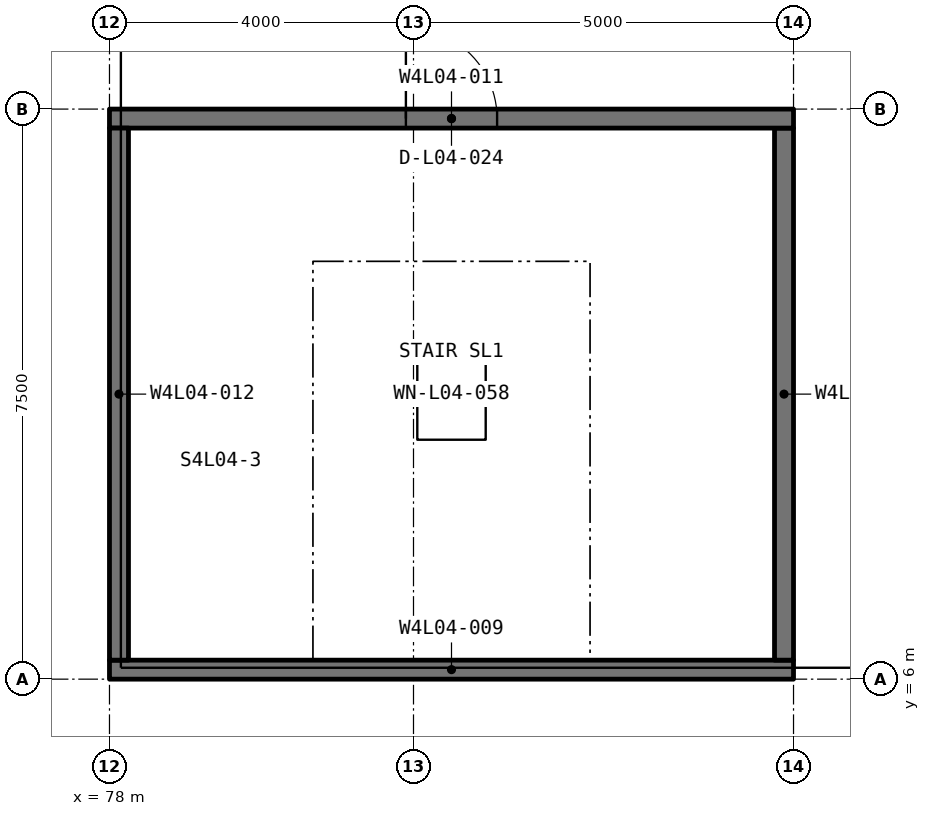
"""IFC4 building model, lengths in metres.
Left out: names, types, materials, properties, quantities, classifications, styles, units other than length and angle.
Written with IfcOpenShell. Run it as: python <this file> out.ifc"""

import sys

from ifc_helpers import new_model, si_unit, direction, frame, frame_2d, origin, origin_2d, place, context, subcontext, project, spatial, rectangle, extrude, element, fill, save


model = new_model("IFC4")
c1 = context("Model", 3, precision=1e-05, world=origin(), true_north=direction((0.0, 1.0)))
c2 = subcontext(c1, "Body", "Model", "MODEL_VIEW")
j1 = project(units=[si_unit("LENGTHUNIT", "METRE"), si_unit("PLANEANGLEUNIT", "RADIAN")], contexts=[c1])
p1 = place(None, origin())
s1 = spatial("IfcSite", under=j1, at=p1, CompositionType="ELEMENT")
p2 = place(p1, origin())
s2 = spatial("IfcBuilding", under=s1, at=p2, CompositionType="ELEMENT")
p3 = place(p2, frame((0.0, 0.0, 20.25)))
s3 = spatial("IfcBuildingStorey", under=s2, at=p3, CompositionType="ELEMENT", Elevation=20.25)
p4 = place(p3, frame((78.0, 6.125, -0.3), z_axis=(0.0, 0.0, 1.0), x_axis=(1.0, 0.0, 0.0)))
e1 = element("IfcWall", 1, at=p4, inside=s3, PredefinedType="SHEAR", context=c2, shape_type="SweptSolid", body=[
    extrude(rectangle(XDim=9.0, YDim=0.25, at=frame_2d((4.5, 0.0))), origin(), (0.0, 0.0, 1.0), 3.05),
])
p5 = place(p3, frame((86.875, 6.25, -0.3), z_axis=(0.0, 0.0, 1.0), x_axis=(0.0, 1.0, 0.0)))
e2 = element("IfcWall", 2, at=p5, inside=s3, PredefinedType="SHEAR", context=c2, shape_type="SweptSolid", body=[
    extrude(rectangle(XDim=7.0, YDim=0.25, at=frame_2d((3.5, 0.0))), origin(), (0.0, 0.0, 1.0), 3.05),
])
p6 = place(p3, frame((78.0, 13.375, -0.3), z_axis=(0.0, 0.0, 1.0), x_axis=(1.0, 0.0, 0.0)))
e3 = element("IfcWall", 3, at=p6, inside=s3, PredefinedType="SHEAR", context=c2, shape_type="SweptSolid", body=[
    extrude(rectangle(XDim=9.0, YDim=0.25, at=frame_2d((4.5, 0.0))), origin(), (0.0, 0.0, 1.0), 3.05),
])
p7 = place(p6, frame((3.9, 0.0, 0.3)))
e4 = element("IfcOpeningElement", 4, at=p7, cuts=e3, PredefinedType="OPENING", context=c2, shape_type="SweptSolid", body=[
    extrude(rectangle(XDim=1.2, YDim=2.2, at=frame_2d((0.6, 1.1))), frame((0.0, 0.135, 0.0), z_axis=(0.0, -1.0, 0.0), x_axis=(1.0, 0.0, 0.0)), (0.0, 0.0, 1.0), 0.27),
])
p8 = place(p3, frame((78.125, 6.25, -0.3), z_axis=(0.0, 0.0, 1.0), x_axis=(0.0, 1.0, 0.0)))
e5 = element("IfcWall", 5, at=p8, inside=s3, PredefinedType="SHEAR", context=c2, shape_type="SweptSolid", body=[
    extrude(rectangle(XDim=7.0, YDim=0.25, at=frame_2d((3.5, 0.0))), origin(), (0.0, 0.0, 1.0), 3.05),
])
p9 = place(p3, frame((0.0, 0.0, 2.75)))
p10 = place(p9, frame((82.5, 9.75, -0.01)))
p11 = place(p10, frame((0.0, 0.0, 0.21)))
e6 = element("IfcWindow", 6, at=p11, inside=s3, PartitioningType="SINGLE_PANEL", PredefinedType="SKYLIGHT", context=c2, shape_type="SweptSolid", body=[
    extrude(rectangle(XDim=0.9, YDim=1.2, at=origin_2d()), origin(), (0.0, 0.0, 1.0), 0.05),
])
p12 = place(p7, origin())
e7 = element("IfcDoor", 7, at=p12, inside=s3, OperationType="SINGLE_SWING_LEFT", PredefinedType="DOOR", context=c2, shape_type="SweptSolid", body=[
    extrude(rectangle(XDim=1.2, YDim=2.2, at=frame_2d((0.6, 1.1))), frame((0.0, 0.025, 0.0), z_axis=(0.0, -1.0, 0.0), x_axis=(1.0, 0.0, 0.0)), (0.0, 0.0, 1.0), 0.05),
])
fill(e4, e7)
save(model, sys.argv[1])
